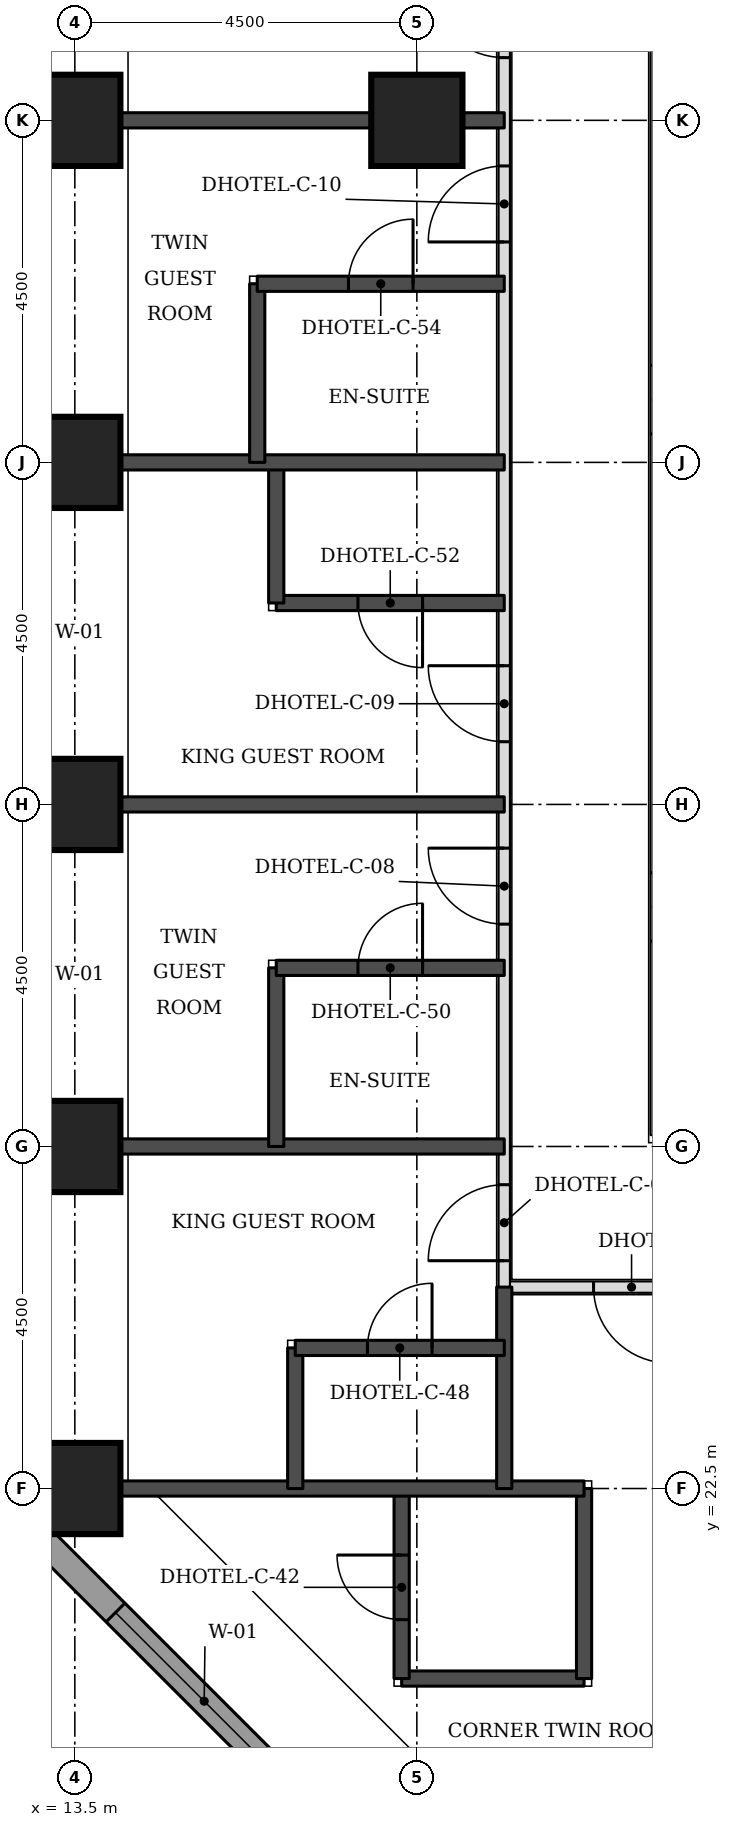
"""IFC4 building model, lengths in metres.
Left out: names, types, materials, properties, quantities, classifications, styles, units other than length and angle.
Written with IfcOpenShell. Run it as: python <this file> out.ifc"""

import sys

from ifc_helpers import new_model, si_unit, direction, frame, frame_2d, origin, origin_2d, place, context, subcontext, project, spatial, rectangle, extrude, element, fill, save


model = new_model("IFC4")
c1 = context("Model", 3, precision=1e-05, world=origin(), true_north=direction((0.0, 1.0)))
c2 = subcontext(c1, "Body", "Model", "MODEL_VIEW")
j1 = project(units=[si_unit("LENGTHUNIT", "METRE"), si_unit("PLANEANGLEUNIT", "RADIAN")], contexts=[c1])
p1 = place(None, origin())
s1 = spatial("IfcSite", under=j1, at=p1, CompositionType="ELEMENT")
p2 = place(p1, origin())
s2 = spatial("IfcBuilding", under=s1, at=p2, CompositionType="ELEMENT")
p3 = place(p2, frame((0.0, 0.0, 33.0)))
s3 = spatial("IfcBuildingStorey", under=s2, at=p3, CompositionType="ELEMENT", Elevation=33.0)
for number, where, z_axis, x_axis in (
    (1, (13.5, 22.5, 0.0), (0.0, 0.0, 1.0), (1.0, 0.0, 0.0)),
    (2, (13.5, 27.0, 0.0), (0.0, 0.0, 1.0), (1.0, 0.0, 0.0)),
    (3, (13.5, 31.5, 0.0), (0.0, 0.0, 1.0), (1.0, 0.0, 0.0)),
    (4, (13.5, 36.0, 0.0), (0.0, 0.0, 1.0), (1.0, 0.0, 0.0)),
    (5, (13.5, 40.5, 0.0), (0.0, 0.0, 1.0), (1.0, 0.0, 0.0)),
    (6, (18.0, 40.5, 0.0), (0.0, 0.0, 1.0), (1.0, 0.0, 0.0)),
):
    element("IfcColumn", number, at=place(p3, frame(where, z_axis=z_axis, x_axis=x_axis)), inside=s3, PredefinedType="COLUMN", context=c2, shape_type="SweptSolid", body=[
        extrude(rectangle(XDim=1.2, YDim=1.2, at=origin_2d()), origin(), (0.0, 0.0, 1.0), 3.3),
    ])
p4 = place(p3, frame((12.674, 22.23, 0.0), z_axis=(0.0, 0.0, 1.0), x_axis=(0.707106781187, -0.707106781187, 0.0)))
e7 = element("IfcWall", 7, at=p4, inside=s3, PredefinedType="STANDARD", context=c2, shape_type="SweptSolid", body=[
    extrude(rectangle(XDim=7.151, YDim=0.35, at=frame_2d((3.576, 0.0))), origin(), (0.0, 0.0, 1.0), 3.055),
])
p5 = place(p4, frame((1.926, 0.0, 0.8)))
e8 = element("IfcOpeningElement", 8, at=p5, cuts=e7, PredefinedType="OPENING", context=c2, shape_type="SweptSolid", body=[
    extrude(rectangle(XDim=3.3, YDim=1.5, at=frame_2d((1.65, 0.75))), frame((0.0, 0.185, 0.0), z_axis=(0.0, -1.0, 0.0), x_axis=(1.0, 0.0, 0.0)), (0.0, 0.0, 1.0), 0.37),
])
p6 = place(p3, frame((19.15, 25.15, 0.0), z_axis=(0.0, 0.0, 1.0), x_axis=(1.0, 0.0, 0.0)))
e9 = element("IfcWall", 9, at=p6, inside=s3, PredefinedType="PARTITIONING", context=c2, shape_type="SweptSolid", body=[
    extrude(rectangle(XDim=33.7, YDim=0.15, at=frame_2d((16.85, 0.0))), origin(), (0.0, 0.0, 1.0), 3.08),
])
p7 = place(p6, frame((4.175, 0.0, 0.0)))
e10 = element("IfcOpeningElement", 10, at=p7, cuts=e9, PredefinedType="OPENING", context=c2, shape_type="SweptSolid", body=[
    extrude(rectangle(XDim=1.0, YDim=2.1, at=frame_2d((0.5, 1.05))), frame((0.0, 0.085, 0.0), z_axis=(0.0, -1.0, 0.0), x_axis=(1.0, 0.0, 0.0)), (0.0, 0.0, 1.0), 0.17),
])
p8 = place(p6, frame((13.325, 0.0, 0.0)))
e11 = element("IfcOpeningElement", 11, at=p8, cuts=e9, PredefinedType="OPENING", context=c2, shape_type="SweptSolid", body=[
    extrude(rectangle(XDim=1.0, YDim=2.1, at=frame_2d((0.5, 1.05))), frame((0.0, 0.085, 0.0), z_axis=(0.0, -1.0, 0.0), x_axis=(1.0, 0.0, 0.0)), (0.0, 0.0, 1.0), 0.17),
])
p9 = place(p6, frame((19.625, 0.0, 0.0)))
e12 = element("IfcOpeningElement", 12, at=p9, cuts=e9, PredefinedType="OPENING", context=c2, shape_type="SweptSolid", body=[
    extrude(rectangle(XDim=1.0, YDim=2.1, at=frame_2d((0.5, 1.05))), frame((0.0, 0.085, 0.0), z_axis=(0.0, -1.0, 0.0), x_axis=(1.0, 0.0, 0.0)), (0.0, 0.0, 1.0), 0.17),
])
p10 = place(p6, frame((28.775, 0.0, 0.0)))
e13 = element("IfcOpeningElement", 13, at=p10, cuts=e9, PredefinedType="OPENING", context=c2, shape_type="SweptSolid", body=[
    extrude(rectangle(XDim=1.0, YDim=2.1, at=frame_2d((0.5, 1.05))), frame((0.0, 0.085, 0.0), z_axis=(0.0, -1.0, 0.0), x_axis=(1.0, 0.0, 0.0)), (0.0, 0.0, 1.0), 0.17),
])
p11 = place(p6, frame((1.175, 0.0, 0.0)))
e14 = element("IfcOpeningElement", 14, at=p11, cuts=e9, PredefinedType="OPENING", context=c2, shape_type="SweptSolid", body=[
    extrude(rectangle(XDim=1.0, YDim=2.1, at=frame_2d((0.5, 1.05))), frame((0.0, 0.085, 0.0), z_axis=(0.0, -1.0, 0.0), x_axis=(1.0, 0.0, 0.0)), (0.0, 0.0, 1.0), 0.17),
])
p12 = place(p6, frame((31.525, 0.0, 0.0)))
e15 = element("IfcOpeningElement", 15, at=p12, cuts=e9, PredefinedType="OPENING", context=c2, shape_type="SweptSolid", body=[
    extrude(rectangle(XDim=1.0, YDim=2.1, at=frame_2d((0.5, 1.05))), frame((0.0, 0.085, 0.0), z_axis=(0.0, -1.0, 0.0), x_axis=(1.0, 0.0, 0.0)), (0.0, 0.0, 1.0), 0.17),
])
p13 = place(p3, frame((19.15, 25.15, 0.0), z_axis=(0.0, 0.0, 1.0), x_axis=(0.0, 1.0, 0.0)))
e16 = element("IfcWall", 16, at=p13, inside=s3, PredefinedType="PARTITIONING", context=c2, shape_type="SweptSolid", body=[
    extrude(rectangle(XDim=24.35, YDim=0.15, at=frame_2d((12.175, 0.0))), origin(), (0.0, 0.0, 1.0), 3.08),
])
p14 = place(p13, frame((0.347, 0.0, 0.0)))
e17 = element("IfcOpeningElement", 17, at=p14, cuts=e16, PredefinedType="OPENING", context=c2, shape_type="SweptSolid", body=[
    extrude(rectangle(XDim=1.0, YDim=2.1, at=frame_2d((0.5, 1.05))), frame((0.0, 0.085, 0.0), z_axis=(0.0, -1.0, 0.0), x_axis=(1.0, 0.0, 0.0)), (0.0, 0.0, 1.0), 0.17),
])
p15 = place(p13, frame((4.775, 0.0, 0.0)))
e18 = element("IfcOpeningElement", 18, at=p15, cuts=e16, PredefinedType="OPENING", context=c2, shape_type="SweptSolid", body=[
    extrude(rectangle(XDim=1.0, YDim=2.1, at=frame_2d((0.5, 1.05))), frame((0.0, 0.085, 0.0), z_axis=(0.0, -1.0, 0.0), x_axis=(1.0, 0.0, 0.0)), (0.0, 0.0, 1.0), 0.17),
])
p16 = place(p13, frame((7.175, 0.0, 0.0)))
e19 = element("IfcOpeningElement", 19, at=p16, cuts=e16, PredefinedType="OPENING", context=c2, shape_type="SweptSolid", body=[
    extrude(rectangle(XDim=1.0, YDim=2.1, at=frame_2d((0.5, 1.05))), frame((0.0, 0.085, 0.0), z_axis=(0.0, -1.0, 0.0), x_axis=(1.0, 0.0, 0.0)), (0.0, 0.0, 1.0), 0.17),
])
p17 = place(p13, frame((13.75, 0.0, 0.0)))
e20 = element("IfcOpeningElement", 20, at=p17, cuts=e16, PredefinedType="OPENING", context=c2, shape_type="SweptSolid", body=[
    extrude(rectangle(XDim=1.0, YDim=2.1, at=frame_2d((0.5, 1.05))), frame((0.0, 0.085, 0.0), z_axis=(0.0, -1.0, 0.0), x_axis=(1.0, 0.0, 0.0)), (0.0, 0.0, 1.0), 0.17),
])
p18 = place(p13, frame((16.175, 0.0, 0.0)))
e21 = element("IfcOpeningElement", 21, at=p18, cuts=e16, PredefinedType="OPENING", context=c2, shape_type="SweptSolid", body=[
    extrude(rectangle(XDim=1.0, YDim=2.1, at=frame_2d((0.5, 1.05))), frame((0.0, 0.085, 0.0), z_axis=(0.0, -1.0, 0.0), x_axis=(1.0, 0.0, 0.0)), (0.0, 0.0, 1.0), 0.17),
])
p19 = place(p13, frame((22.775, 0.0, 0.0)))
e22 = element("IfcOpeningElement", 22, at=p19, cuts=e16, PredefinedType="OPENING", context=c2, shape_type="SweptSolid", body=[
    extrude(rectangle(XDim=1.0, YDim=2.1, at=frame_2d((0.5, 1.05))), frame((0.0, 0.085, 0.0), z_axis=(0.0, -1.0, 0.0), x_axis=(1.0, 0.0, 0.0)), (0.0, 0.0, 1.0), 0.17),
])
p20 = place(p3, frame((21.15, 27.15, 0.0), z_axis=(0.0, 0.0, 1.0), x_axis=(0.0, 1.0, 0.0)))
e23 = element("IfcWall", 23, at=p20, inside=s3, PredefinedType="PARTITIONING", context=c2, shape_type="SweptSolid", body=[
    extrude(rectangle(XDim=15.85, YDim=0.15, at=frame_2d((7.925, 0.0))), origin(), (0.0, 0.0, 1.0), 3.08),
])
p21 = place(p20, frame((2.55, 0.0, 0.0)))
e24 = element("IfcOpeningElement", 24, at=p21, cuts=e23, PredefinedType="OPENING", context=c2, shape_type="SweptSolid", body=[
    extrude(rectangle(XDim=0.9, YDim=2.1, at=frame_2d((0.45, 1.05))), frame((0.0, 0.085, 0.0), z_axis=(0.0, -1.0, 0.0), x_axis=(1.0, 0.0, 0.0)), (0.0, 0.0, 1.0), 0.17),
])
p22 = place(p20, frame((9.225, 0.0, 0.0)))
e25 = element("IfcOpeningElement", 25, at=p22, cuts=e23, PredefinedType="OPENING", context=c2, shape_type="SweptSolid", body=[
    extrude(rectangle(XDim=0.9, YDim=2.1, at=frame_2d((0.45, 1.05))), frame((0.0, 0.085, 0.0), z_axis=(0.0, -1.0, 0.0), x_axis=(1.0, 0.0, 0.0)), (0.0, 0.0, 1.0), 0.17),
])
p23 = place(p3, frame((17.8, 20.0, 0.0), z_axis=(0.0, 0.0, 1.0), x_axis=(1.0, 0.0, 0.0)))
e26 = element("IfcWall", 26, at=p23, inside=s3, PredefinedType="SOLIDWALL", context=c2, shape_type="SweptSolid", body=[
    extrude(rectangle(XDim=2.4, YDim=0.2, at=frame_2d((1.2, 0.0))), origin(), (0.0, 0.0, 1.0), 3.08),
])
p24 = place(p3, frame((17.8, 20.0, 0.0), z_axis=(0.0, 0.0, 1.0), x_axis=(0.0, 1.0, 0.0)))
e27 = element("IfcWall", 27, at=p24, inside=s3, PredefinedType="SOLIDWALL", context=c2, shape_type="SweptSolid", body=[
    extrude(rectangle(XDim=2.5, YDim=0.2, at=frame_2d((1.25, 0.0))), origin(), (0.0, 0.0, 1.0), 3.08),
])
p25 = place(p24, frame((0.775, 0.0, 0.0)))
e28 = element("IfcOpeningElement", 28, at=p25, cuts=e27, PredefinedType="OPENING", context=c2, shape_type="SweptSolid", body=[
    extrude(rectangle(XDim=0.85, YDim=2.1, at=frame_2d((0.425, 1.05))), frame((0.0, 0.11, 0.0), z_axis=(0.0, -1.0, 0.0), x_axis=(1.0, 0.0, 0.0)), (0.0, 0.0, 1.0), 0.22),
])
p26 = place(p3, frame((20.2, 20.0, 0.0), z_axis=(0.0, 0.0, 1.0), x_axis=(0.0, 1.0, 0.0)))
e29 = element("IfcWall", 29, at=p26, inside=s3, PredefinedType="SOLIDWALL", context=c2, shape_type="SweptSolid", body=[
    extrude(rectangle(XDim=2.5, YDim=0.2, at=frame_2d((1.25, 0.0))), origin(), (0.0, 0.0, 1.0), 3.08),
])
p27 = place(p3, frame((14.1, 22.5, 0.0), z_axis=(0.0, 0.0, 1.0), x_axis=(1.0, 0.0, 0.0)))
e30 = element("IfcWall", 30, at=p27, inside=s3, PredefinedType="SOLIDWALL", context=c2, shape_type="SweptSolid", body=[
    extrude(rectangle(XDim=6.1, YDim=0.2, at=frame_2d((3.05, 0.0))), origin(), (0.0, 0.0, 1.0), 3.08),
])
p28 = place(p3, frame((16.4, 22.5, 0.0), z_axis=(0.0, 0.0, 1.0), x_axis=(0.0, 1.0, 0.0)))
e31 = element("IfcWall", 31, at=p28, inside=s3, PredefinedType="SOLIDWALL", context=c2, shape_type="SweptSolid", body=[
    extrude(rectangle(XDim=1.85, YDim=0.2, at=frame_2d((0.925, 0.0))), origin(), (0.0, 0.0, 1.0), 3.08),
])
p29 = place(p3, frame((19.15, 22.5, 0.0), z_axis=(0.0, 0.0, 1.0), x_axis=(0.0, 1.0, 0.0)))
e32 = element("IfcWall", 32, at=p29, inside=s3, PredefinedType="SOLIDWALL", context=c2, shape_type="SweptSolid", body=[
    extrude(rectangle(XDim=2.65, YDim=0.2, at=frame_2d((1.325, 0.0))), origin(), (0.0, 0.0, 1.0), 3.08),
])
p30 = place(p3, frame((16.4, 24.35, 0.0), z_axis=(0.0, 0.0, 1.0), x_axis=(1.0, 0.0, 0.0)))
e33 = element("IfcWall", 33, at=p30, inside=s3, PredefinedType="SOLIDWALL", context=c2, shape_type="SweptSolid", body=[
    extrude(rectangle(XDim=2.75, YDim=0.2, at=frame_2d((1.375, 0.0))), origin(), (0.0, 0.0, 1.0), 3.08),
])
p31 = place(p30, frame((0.95, 0.0, 0.0)))
e34 = element("IfcOpeningElement", 34, at=p31, cuts=e33, PredefinedType="OPENING", context=c2, shape_type="SweptSolid", body=[
    extrude(rectangle(XDim=0.85, YDim=2.1, at=frame_2d((0.425, 1.05))), frame((0.0, 0.11, 0.0), z_axis=(0.0, -1.0, 0.0), x_axis=(1.0, 0.0, 0.0)), (0.0, 0.0, 1.0), 0.22),
])
p32 = place(p3, frame((14.1, 27.0, 0.0), z_axis=(0.0, 0.0, 1.0), x_axis=(1.0, 0.0, 0.0)))
e35 = element("IfcWall", 35, at=p32, inside=s3, PredefinedType="SOLIDWALL", context=c2, shape_type="SweptSolid", body=[
    extrude(rectangle(XDim=5.05, YDim=0.2, at=frame_2d((2.525, 0.0))), origin(), (0.0, 0.0, 1.0), 3.08),
])
p33 = place(p3, frame((16.15, 27.0, 0.0), z_axis=(0.0, 0.0, 1.0), x_axis=(0.0, 1.0, 0.0)))
e36 = element("IfcWall", 36, at=p33, inside=s3, PredefinedType="SOLIDWALL", context=c2, shape_type="SweptSolid", body=[
    extrude(rectangle(XDim=2.35, YDim=0.2, at=frame_2d((1.175, 0.0))), origin(), (0.0, 0.0, 1.0), 3.08),
])
p34 = place(p3, frame((16.15, 29.35, 0.0), z_axis=(0.0, 0.0, 1.0), x_axis=(1.0, 0.0, 0.0)))
e37 = element("IfcWall", 37, at=p34, inside=s3, PredefinedType="SOLIDWALL", context=c2, shape_type="SweptSolid", body=[
    extrude(rectangle(XDim=3.0, YDim=0.2, at=frame_2d((1.5, 0.0))), origin(), (0.0, 0.0, 1.0), 3.08),
])
p35 = place(p34, frame((1.075, 0.0, 0.0)))
e38 = element("IfcOpeningElement", 38, at=p35, cuts=e37, PredefinedType="OPENING", context=c2, shape_type="SweptSolid", body=[
    extrude(rectangle(XDim=0.85, YDim=2.1, at=frame_2d((0.425, 1.05))), frame((0.0, 0.11, 0.0), z_axis=(0.0, -1.0, 0.0), x_axis=(1.0, 0.0, 0.0)), (0.0, 0.0, 1.0), 0.22),
])
p36 = place(p3, frame((14.1, 31.5, 0.0), z_axis=(0.0, 0.0, 1.0), x_axis=(1.0, 0.0, 0.0)))
e39 = element("IfcWall", 39, at=p36, inside=s3, PredefinedType="SOLIDWALL", context=c2, shape_type="SweptSolid", body=[
    extrude(rectangle(XDim=5.05, YDim=0.2, at=frame_2d((2.525, 0.0))), origin(), (0.0, 0.0, 1.0), 3.08),
])
p37 = place(p3, frame((16.15, 34.15, 0.0), z_axis=(0.0, 0.0, 1.0), x_axis=(1.0, 0.0, 0.0)))
e40 = element("IfcWall", 40, at=p37, inside=s3, PredefinedType="SOLIDWALL", context=c2, shape_type="SweptSolid", body=[
    extrude(rectangle(XDim=3.0, YDim=0.2, at=frame_2d((1.5, 0.0))), origin(), (0.0, 0.0, 1.0), 3.08),
])
p38 = place(p37, frame((1.075, 0.0, 0.0)))
e41 = element("IfcOpeningElement", 41, at=p38, cuts=e40, PredefinedType="OPENING", context=c2, shape_type="SweptSolid", body=[
    extrude(rectangle(XDim=0.85, YDim=2.1, at=frame_2d((0.425, 1.05))), frame((0.0, 0.11, 0.0), z_axis=(0.0, -1.0, 0.0), x_axis=(1.0, 0.0, 0.0)), (0.0, 0.0, 1.0), 0.22),
])
p39 = place(p3, frame((16.15, 34.15, 0.0), z_axis=(0.0, 0.0, 1.0), x_axis=(0.0, 1.0, 0.0)))
e42 = element("IfcWall", 42, at=p39, inside=s3, PredefinedType="SOLIDWALL", context=c2, shape_type="SweptSolid", body=[
    extrude(rectangle(XDim=1.85, YDim=0.2, at=frame_2d((0.925, 0.0))), origin(), (0.0, 0.0, 1.0), 3.08),
])
p40 = place(p3, frame((14.1, 36.0, 0.0), z_axis=(0.0, 0.0, 1.0), x_axis=(1.0, 0.0, 0.0)))
e43 = element("IfcWall", 43, at=p40, inside=s3, PredefinedType="SOLIDWALL", context=c2, shape_type="SweptSolid", body=[
    extrude(rectangle(XDim=5.05, YDim=0.2, at=frame_2d((2.525, 0.0))), origin(), (0.0, 0.0, 1.0), 3.08),
])
p41 = place(p3, frame((15.9, 36.0, 0.0), z_axis=(0.0, 0.0, 1.0), x_axis=(0.0, 1.0, 0.0)))
e44 = element("IfcWall", 44, at=p41, inside=s3, PredefinedType="SOLIDWALL", context=c2, shape_type="SweptSolid", body=[
    extrude(rectangle(XDim=2.35, YDim=0.2, at=frame_2d((1.175, 0.0))), origin(), (0.0, 0.0, 1.0), 3.08),
])
p42 = place(p3, frame((15.9, 38.35, 0.0), z_axis=(0.0, 0.0, 1.0), x_axis=(1.0, 0.0, 0.0)))
e45 = element("IfcWall", 45, at=p42, inside=s3, PredefinedType="SOLIDWALL", context=c2, shape_type="SweptSolid", body=[
    extrude(rectangle(XDim=3.25, YDim=0.2, at=frame_2d((1.625, 0.0))), origin(), (0.0, 0.0, 1.0), 3.08),
])
p43 = place(p42, frame((1.2, 0.0, 0.0)))
e46 = element("IfcOpeningElement", 46, at=p43, cuts=e45, PredefinedType="OPENING", context=c2, shape_type="SweptSolid", body=[
    extrude(rectangle(XDim=0.85, YDim=2.1, at=frame_2d((0.425, 1.05))), frame((0.0, 0.11, 0.0), z_axis=(0.0, -1.0, 0.0), x_axis=(1.0, 0.0, 0.0)), (0.0, 0.0, 1.0), 0.22),
])
p44 = place(p3, frame((14.1, 40.5, 0.0), z_axis=(0.0, 0.0, 1.0), x_axis=(1.0, 0.0, 0.0)))
e47 = element("IfcWall", 47, at=p44, inside=s3, PredefinedType="SOLIDWALL", context=c2, shape_type="SweptSolid", body=[
    extrude(rectangle(XDim=5.05, YDim=0.2, at=frame_2d((2.525, 0.0))), origin(), (0.0, 0.0, 1.0), 3.08),
])
p45 = place(p5, origin())
e48 = element("IfcWindow", 48, at=p45, inside=s3, PartitioningType="SINGLE_PANEL", PredefinedType="WINDOW", context=c2, shape_type="SweptSolid", body=[
    extrude(rectangle(XDim=3.3, YDim=1.5, at=frame_2d((1.65, 0.75))), frame((0.0, 0.085, 0.0), z_axis=(0.0, -1.0, 0.0), x_axis=(1.0, 0.0, 0.0)), (0.0, 0.0, 1.0), 0.06),
])
fill(e8, e48)
p46 = place(p14, origin())
e49 = element("IfcDoor", 49, at=p46, inside=s3, OperationType="SINGLE_SWING_LEFT", PredefinedType="DOOR", context=c2, shape_type="SweptSolid", body=[
    extrude(rectangle(XDim=1.0, YDim=2.1, at=frame_2d((0.5, 1.05))), frame((0.0, 0.025, 0.0), z_axis=(0.0, -1.0, 0.0), x_axis=(1.0, 0.0, 0.0)), (0.0, 0.0, 1.0), 0.05),
])
fill(e17, e49)
p47 = place(p31, origin())
e50 = element("IfcDoor", 50, at=p47, inside=s3, OperationType="SINGLE_SWING_RIGHT", PredefinedType="DOOR", context=c2, shape_type="SweptSolid", body=[
    extrude(rectangle(XDim=0.85, YDim=2.1, at=frame_2d((0.425, 1.05))), frame((0.0, 0.025, 0.0), z_axis=(0.0, -1.0, 0.0), x_axis=(1.0, 0.0, 0.0)), (0.0, 0.0, 1.0), 0.05),
])
fill(e34, e50)
p48 = place(p15, origin())
e51 = element("IfcDoor", 51, at=p48, inside=s3, OperationType="SINGLE_SWING_RIGHT", PredefinedType="DOOR", context=c2, shape_type="SweptSolid", body=[
    extrude(rectangle(XDim=1.0, YDim=2.1, at=frame_2d((0.5, 1.05))), frame((0.0, 0.025, 0.0), z_axis=(0.0, -1.0, 0.0), x_axis=(1.0, 0.0, 0.0)), (0.0, 0.0, 1.0), 0.05),
])
fill(e18, e51)
p49 = place(p35, origin())
e52 = element("IfcDoor", 52, at=p49, inside=s3, OperationType="SINGLE_SWING_RIGHT", PredefinedType="DOOR", context=c2, shape_type="SweptSolid", body=[
    extrude(rectangle(XDim=0.85, YDim=2.1, at=frame_2d((0.425, 1.05))), frame((0.0, 0.025, 0.0), z_axis=(0.0, -1.0, 0.0), x_axis=(1.0, 0.0, 0.0)), (0.0, 0.0, 1.0), 0.05),
])
fill(e38, e52)
p50 = place(p16, origin())
e53 = element("IfcDoor", 53, at=p50, inside=s3, OperationType="SINGLE_SWING_RIGHT", PredefinedType="DOOR", context=c2, shape_type="SweptSolid", body=[
    extrude(rectangle(XDim=1.0, YDim=2.1, at=frame_2d((0.5, 1.05))), frame((0.0, 0.025, 0.0), z_axis=(0.0, -1.0, 0.0), x_axis=(1.0, 0.0, 0.0)), (0.0, 0.0, 1.0), 0.05),
])
fill(e19, e53)
p51 = place(p38, frame((0.85, 0.0, 0.0), z_axis=(0.0, 0.0, 1.0), x_axis=(-1.0, 0.0, 0.0)))
e54 = element("IfcDoor", 54, at=p51, inside=s3, OperationType="SINGLE_SWING_LEFT", PredefinedType="DOOR", context=c2, shape_type="SweptSolid", body=[
    extrude(rectangle(XDim=0.85, YDim=2.1, at=frame_2d((0.425, 1.05))), frame((0.0, 0.025, 0.0), z_axis=(0.0, -1.0, 0.0), x_axis=(1.0, 0.0, 0.0)), (0.0, 0.0, 1.0), 0.05),
])
fill(e41, e54)
p52 = place(p17, origin())
e55 = element("IfcDoor", 55, at=p52, inside=s3, OperationType="SINGLE_SWING_LEFT", PredefinedType="DOOR", context=c2, shape_type="SweptSolid", body=[
    extrude(rectangle(XDim=1.0, YDim=2.1, at=frame_2d((0.5, 1.05))), frame((0.0, 0.025, 0.0), z_axis=(0.0, -1.0, 0.0), x_axis=(1.0, 0.0, 0.0)), (0.0, 0.0, 1.0), 0.05),
])
fill(e20, e55)
p53 = place(p43, origin())
e56 = element("IfcDoor", 56, at=p53, inside=s3, OperationType="SINGLE_SWING_RIGHT", PredefinedType="DOOR", context=c2, shape_type="SweptSolid", body=[
    extrude(rectangle(XDim=0.85, YDim=2.1, at=frame_2d((0.425, 1.05))), frame((0.0, 0.025, 0.0), z_axis=(0.0, -1.0, 0.0), x_axis=(1.0, 0.0, 0.0)), (0.0, 0.0, 1.0), 0.05),
])
fill(e46, e56)
p54 = place(p18, origin())
e57 = element("IfcDoor", 57, at=p54, inside=s3, OperationType="SINGLE_SWING_RIGHT", PredefinedType="DOOR", context=c2, shape_type="SweptSolid", body=[
    extrude(rectangle(XDim=1.0, YDim=2.1, at=frame_2d((0.5, 1.05))), frame((0.0, 0.025, 0.0), z_axis=(0.0, -1.0, 0.0), x_axis=(1.0, 0.0, 0.0)), (0.0, 0.0, 1.0), 0.05),
])
fill(e21, e57)
p55 = place(p11, frame((1.0, 0.0, 0.0), z_axis=(0.0, 0.0, 1.0), x_axis=(-1.0, 0.0, 0.0)))
e58 = element("IfcDoor", 58, at=p55, inside=s3, OperationType="SINGLE_SWING_LEFT", PredefinedType="DOOR", context=c2, shape_type="SweptSolid", body=[
    extrude(rectangle(XDim=1.0, YDim=2.1, at=frame_2d((0.5, 1.05))), frame((0.0, 0.025, 0.0), z_axis=(0.0, -1.0, 0.0), x_axis=(1.0, 0.0, 0.0)), (0.0, 0.0, 1.0), 0.05),
])
fill(e14, e58)
p56 = place(p25, origin())
e59 = element("IfcDoor", 59, at=p56, inside=s3, OperationType="SINGLE_SWING_RIGHT", PredefinedType="DOOR", context=c2, shape_type="SweptSolid", body=[
    extrude(rectangle(XDim=0.85, YDim=2.1, at=frame_2d((0.425, 1.05))), frame((0.0, 0.025, 0.0), z_axis=(0.0, -1.0, 0.0), x_axis=(1.0, 0.0, 0.0)), (0.0, 0.0, 1.0), 0.05),
])
fill(e28, e59)
save(model, sys.argv[1])
